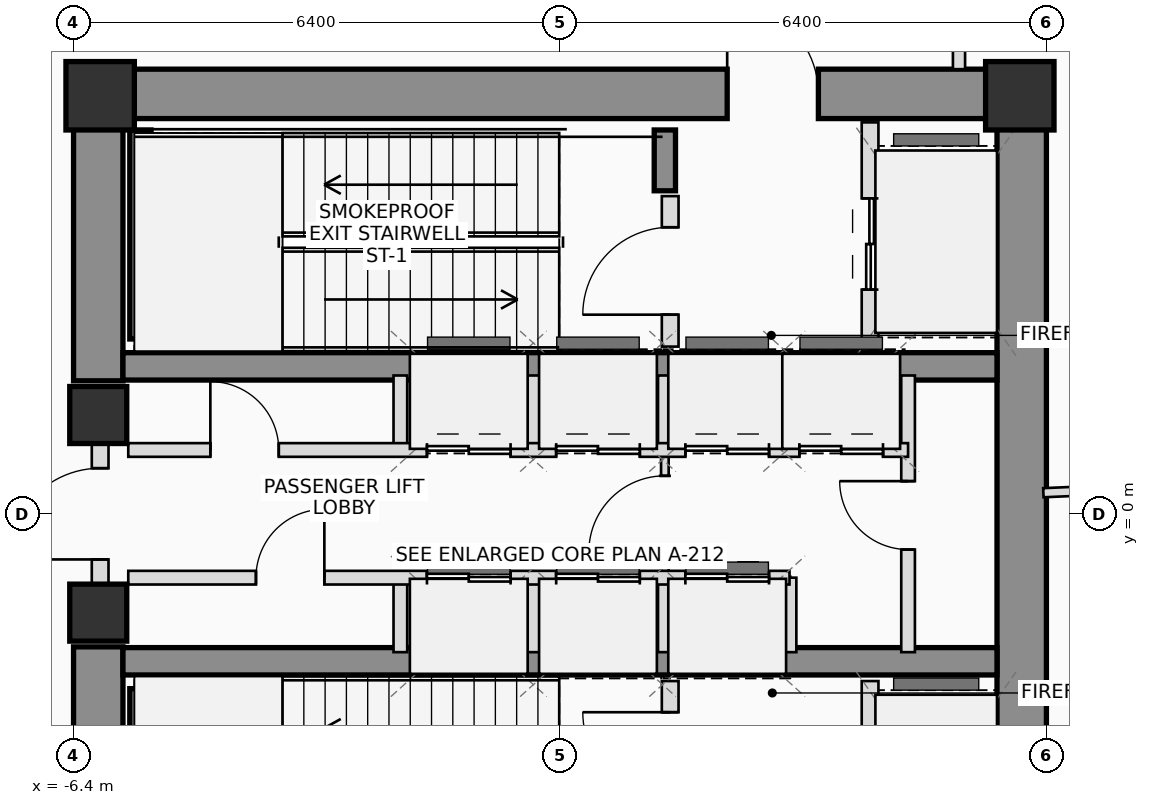
"""IFC4 building model, lengths in metres.
Left out: names, types, materials, properties, quantities, classifications, styles, units other than length and angle.
Written with IfcOpenShell. Run it as: python <this file> out.ifc"""

import sys

from ifc_helpers import new_model, si_unit, direction, frame, frame_2d, origin, origin_2d, place, context, subcontext, project, spatial, rectangle, extrude, source, transform, mapped, element, fill, save


model = new_model("IFC4")
c1 = context("Model", 3, precision=1e-05, world=origin(), true_north=direction((0.0, 1.0)))
c2 = subcontext(c1, "Body", "Model", "MODEL_VIEW")
j1 = project(units=[si_unit("LENGTHUNIT", "METRE"), si_unit("PLANEANGLEUNIT", "RADIAN")], contexts=[c1])
p1 = place(None, origin())
s1 = spatial("IfcSite", under=j1, at=p1, CompositionType="ELEMENT")
p2 = place(p1, origin())
s2 = spatial("IfcBuilding", under=s1, at=p2, CompositionType="ELEMENT")
p3 = place(p2, frame((0.0, 0.0, 125.0)))
s3 = spatial("IfcBuildingStorey", under=s2, at=p3, CompositionType="ELEMENT", Elevation=125.0)
m1 = source(origin(), c2, "Body", "SweptSolid", [
    extrude(rectangle(XDim=0.9, YDim=0.9, at=origin_2d()), origin(), (0.0, 0.0, 1.0), 4.5),
])
for number, where, z_axis, x_axis in (
    (1, (6.05, 5.5, 0.0), (0.0, 0.0, 1.0), (1.0, 0.0, 0.0)),
    (2, (-6.05, 5.5, 0.0), (0.0, 0.0, 1.0), (1.0, 0.0, 0.0)),
):
    element("IfcColumn", number, at=place(p3, frame(where, z_axis=z_axis, x_axis=x_axis)), inside=s3, PredefinedType="COLUMN", context=c2, shape_type="MappedRepresentation", body=[
        mapped(m1, transform((0.0, 0.0, 0.0), scale=1.0)),
    ])
p4 = place(p3, frame((-6.4, 5.525, 0.0), z_axis=(0.0, 0.0, 1.0), x_axis=(1.0, 0.0, 0.0)))
e3 = element("IfcWall", 3, at=p4, inside=s3, PredefinedType="SHEAR", context=c2, shape_type="SweptSolid", body=[
    extrude(rectangle(XDim=12.8, YDim=0.65, at=frame_2d((6.4, 0.0))), origin(), (0.0, 0.0, 1.0), 4.5),
])
p5 = place(p4, frame((8.6, 0.0, 0.0)))
e4 = element("IfcOpeningElement", 4, at=p5, cuts=e3, PredefinedType="OPENING", context=c2, shape_type="SweptSolid", body=[
    extrude(rectangle(XDim=1.2, YDim=2.2, at=frame_2d((0.6, 1.1))), frame((0.0, 0.335, 0.0), z_axis=(0.0, -1.0, 0.0), x_axis=(1.0, 0.0, 0.0)), (0.0, 0.0, 1.0), 0.67),
])
p6 = place(p3, frame((6.075, -5.2, 0.0), z_axis=(0.0, 0.0, 1.0), x_axis=(0.0, 1.0, 0.0)))
e5 = element("IfcWall", 5, at=p6, inside=s3, PredefinedType="SHEAR", context=c2, shape_type="SweptSolid", body=[
    extrude(rectangle(XDim=10.4, YDim=0.65, at=frame_2d((5.2, 0.0))), origin(), (0.0, 0.0, 1.0), 4.5),
])
for number, where, z_axis, x_axis in (
    (6, (-6.075, -5.2, 0.0), (0.0, 0.0, 1.0), (0.0, 1.0, 0.0)),
    (7, (-6.075, 1.75, 0.0), (0.0, 0.0, 1.0), (0.0, 1.0, 0.0)),
):
    element("IfcWall", number, at=place(p3, frame(where, z_axis=z_axis, x_axis=x_axis)), inside=s3, PredefinedType="SHEAR", context=c2, shape_type="SweptSolid", body=[
        extrude(rectangle(XDim=3.45, YDim=0.65, at=frame_2d((1.725, 0.0))), origin(), (0.0, 0.0, 1.0), 4.5),
    ])
for number, where, z_axis, x_axis in (
    (8, (-5.75, 1.94, 0.0), (0.0, 0.0, 1.0), (1.0, 0.0, 0.0)),
    (9, (-5.75, -1.94, 0.0), (0.0, 0.0, 1.0), (1.0, 0.0, 0.0)),
):
    element("IfcWall", number, at=place(p3, frame(where, z_axis=z_axis, x_axis=x_axis)), inside=s3, PredefinedType="SHEAR", context=c2, shape_type="SweptSolid", body=[
        extrude(rectangle(XDim=11.5, YDim=0.36, at=frame_2d((5.75, 0.0))), origin(), (0.0, 0.0, 1.0), 4.5),
    ])
p7 = place(p3, frame((-5.52, 2.3, 0.0), z_axis=(0.0, 0.0, 1.0), x_axis=(0.0, 1.0, 0.0)))
e10 = element("IfcWall", 10, at=p7, inside=s3, PredefinedType="SHEAR", context=c2, shape_type="SweptSolid", body=[
    extrude(rectangle(XDim=2.75, YDim=0.28, at=frame_2d((1.375, 0.0))), origin(), (0.0, 0.0, 1.0), 4.5),
])
p8 = place(p3, frame((1.38, 4.25, 0.0), z_axis=(0.0, 0.0, 1.0), x_axis=(0.0, 1.0, 0.0)))
e11 = element("IfcWall", 11, at=p8, inside=s3, PredefinedType="SHEAR", context=c2, shape_type="SweptSolid", body=[
    extrude(rectangle(XDim=0.8, YDim=0.28, at=frame_2d((0.4, 0.0))), origin(), (0.0, 0.0, 1.0), 4.5),
])
p9 = place(p3, frame((-5.52, -5.05, 0.0), z_axis=(0.0, 0.0, 1.0), x_axis=(0.0, 1.0, 0.0)))
e12 = element("IfcWall", 12, at=p9, inside=s3, PredefinedType="SHEAR", context=c2, shape_type="SweptSolid", body=[
    extrude(rectangle(XDim=2.75, YDim=0.28, at=frame_2d((1.375, 0.0))), origin(), (0.0, 0.0, 1.0), 4.5),
])
m2 = source(origin(), c2, "Body", "SweptSolid", [
    extrude(rectangle(XDim=0.75, YDim=0.75, at=origin_2d()), origin(), (0.0, 0.0, 1.0), 4.5),
])
for number, where, z_axis, x_axis in (
    (13, (-6.075, -1.3, 0.0), (0.0, 0.0, 1.0), (1.0, 0.0, 0.0)),
    (14, (-6.075, 1.3, 0.0), (0.0, 0.0, 1.0), (1.0, 0.0, 0.0)),
):
    element("IfcColumn", number, at=place(p3, frame(where, z_axis=z_axis, x_axis=x_axis)), inside=s3, PredefinedType="COLUMN", context=c2, shape_type="MappedRepresentation", body=[
        mapped(m2, transform((0.0, 0.0, 0.0), scale=1.0)),
    ])
p10 = place(p3, frame((-6.05, -0.95, 0.0), z_axis=(0.0, 0.0, 1.0), x_axis=(0.0, 1.0, 0.0)))
e15 = element("IfcWall", 15, at=p10, inside=s3, PredefinedType="PLUMBINGWALL", context=c2, shape_type="SweptSolid", body=[
    extrude(rectangle(XDim=1.9, YDim=0.22, at=frame_2d((0.95, 0.0))), origin(), (0.0, 0.0, 1.0), 3.28),
])
p11 = place(p10, frame((0.35, 0.0, 0.0)))
e16 = element("IfcOpeningElement", 16, at=p11, cuts=e15, PredefinedType="OPENING", context=c2, shape_type="SweptSolid", body=[
    extrude(rectangle(XDim=1.2, YDim=2.2, at=frame_2d((0.6, 1.1))), frame((0.0, 0.12, 0.0), z_axis=(0.0, -1.0, 0.0), x_axis=(1.0, 0.0, 0.0)), (0.0, 0.0, 1.0), 0.24),
])
p12 = place(p3, frame((1.45, 2.2, 0.0), z_axis=(0.0, 0.0, 1.0), x_axis=(0.0, 1.0, 0.0)))
e17 = element("IfcWall", 17, at=p12, inside=s3, PredefinedType="PLUMBINGWALL", context=c2, shape_type="SweptSolid", body=[
    extrude(rectangle(XDim=1.98, YDim=0.22, at=frame_2d((0.99, 0.0))), origin(), (0.0, 0.0, 1.0), 4.3),
])
p13 = place(p12, frame((0.42, 0.0, 0.0)))
e18 = element("IfcOpeningElement", 18, at=p13, cuts=e17, PredefinedType="OPENING", context=c2, shape_type="SweptSolid", body=[
    extrude(rectangle(XDim=1.15, YDim=2.15, at=frame_2d((0.575, 1.075))), frame((0.0, 0.12, 0.0), z_axis=(0.0, -1.0, 0.0), x_axis=(1.0, 0.0, 0.0)), (0.0, 0.0, 1.0), 0.24),
])
p14 = place(p3, frame((4.08, 2.2, 0.0), z_axis=(0.0, 0.0, 1.0), x_axis=(0.0, 1.0, 0.0)))
e19 = element("IfcWall", 19, at=p14, inside=s3, PredefinedType="PLUMBINGWALL", context=c2, shape_type="SweptSolid", body=[
    extrude(rectangle(XDim=2.95, YDim=0.22, at=frame_2d((1.475, 0.0))), origin(), (0.0, 0.0, 1.0), 4.3),
])
p15 = place(p14, frame((0.75, 0.0, 0.0)))
e20 = element("IfcOpeningElement", 20, at=p15, cuts=e19, PredefinedType="OPENING", context=c2, shape_type="SweptSolid", body=[
    extrude(rectangle(XDim=1.2, YDim=2.25, at=frame_2d((0.6, 1.125))), frame((0.0, 0.12, 0.0), z_axis=(0.0, -1.0, 0.0), x_axis=(1.0, 0.0, 0.0)), (0.0, 0.0, 1.0), 0.24),
])
p16 = place(p3, frame((1.45, -4.18, 0.0), z_axis=(0.0, 0.0, 1.0), x_axis=(0.0, 1.0, 0.0)))
e21 = element("IfcWall", 21, at=p16, inside=s3, PredefinedType="PLUMBINGWALL", context=c2, shape_type="SweptSolid", body=[
    extrude(rectangle(XDim=1.98, YDim=0.22, at=frame_2d((0.99, 0.0))), origin(), (0.0, 0.0, 1.0), 4.3),
])
p17 = place(p16, frame((0.42, 0.0, 0.0)))
e22 = element("IfcOpeningElement", 22, at=p17, cuts=e21, PredefinedType="OPENING", context=c2, shape_type="SweptSolid", body=[
    extrude(rectangle(XDim=1.15, YDim=2.15, at=frame_2d((0.575, 1.075))), frame((0.0, 0.12, 0.0), z_axis=(0.0, -1.0, 0.0), x_axis=(1.0, 0.0, 0.0)), (0.0, 0.0, 1.0), 0.24),
])
p18 = place(p3, frame((4.08, -5.15, 0.0), z_axis=(0.0, 0.0, 1.0), x_axis=(0.0, 1.0, 0.0)))
e23 = element("IfcWall", 23, at=p18, inside=s3, PredefinedType="PLUMBINGWALL", context=c2, shape_type="SweptSolid", body=[
    extrude(rectangle(XDim=2.95, YDim=0.22, at=frame_2d((1.475, 0.0))), origin(), (0.0, 0.0, 1.0), 4.3),
])
p19 = place(p18, frame((0.95, 0.0, 0.0)))
e24 = element("IfcOpeningElement", 24, at=p19, cuts=e23, PredefinedType="OPENING", context=c2, shape_type="SweptSolid", body=[
    extrude(rectangle(XDim=1.2, YDim=2.25, at=frame_2d((0.6, 1.125))), frame((0.0, 0.12, 0.0), z_axis=(0.0, -1.0, 0.0), x_axis=(1.0, 0.0, 0.0)), (0.0, 0.0, 1.0), 0.24),
])
p20 = place(p3, frame((1.38, -0.84, 0.0), z_axis=(0.0, 0.0, 1.0), x_axis=(0.0, 1.0, 0.0)))
e25 = element("IfcWall", 25, at=p20, inside=s3, PredefinedType="PARTITIONING", context=c2, shape_type="SweptSolid", body=[
    extrude(rectangle(XDim=1.68, YDim=0.1, at=frame_2d((0.84, 0.0))), origin(), (0.0, 0.0, 1.0), 4.3),
])
p21 = place(p20, frame((0.34, 0.0, 0.0)))
e26 = element("IfcOpeningElement", 26, at=p21, cuts=e25, PredefinedType="OPENING", context=c2, shape_type="SweptSolid", body=[
    extrude(rectangle(XDim=1.0, YDim=2.25, at=frame_2d((0.5, 1.125))), frame((0.0, 0.06, 0.0), z_axis=(0.0, -1.0, 0.0), x_axis=(1.0, 0.0, 0.0)), (0.0, 0.0, 1.0), 0.12),
])
for number, where, z_axis, x_axis in (
    (27, (-2.1, 0.84, 0.0), (0.0, 0.0, 1.0), (0.0, 1.0, 0.0)),
    (28, (-2.1, -1.82, 0.0), (0.0, 0.0, 1.0), (0.0, 1.0, 0.0)),
    (29, (-0.35, 0.84, 0.0), (0.0, 0.0, 1.0), (0.0, 1.0, 0.0)),
    (30, (-0.35, -1.82, 0.0), (0.0, 0.0, 1.0), (0.0, 1.0, 0.0)),
    (31, (1.38, 0.84, 0.0), (0.0, 0.0, 1.0), (0.0, 1.0, 0.0)),
    (32, (1.38, -1.82, 0.0), (0.0, 0.0, 1.0), (0.0, 1.0, 0.0)),
    (33, (3.02, 0.84, 0.0), (0.0, 0.0, 1.0), (0.0, 1.0, 0.0)),
    (34, (4.38, 0.84, 0.0), (0.0, 0.0, 1.0), (0.0, 1.0, 0.0)),
    (35, (3.02, -1.82, 0.0), (0.0, 0.0, 1.0), (0.0, 1.0, 0.0)),
):
    element("IfcWall", number, at=place(p3, frame(where, z_axis=z_axis, x_axis=x_axis)), inside=s3, PredefinedType="PLUMBINGWALL", context=c2, shape_type="SweptSolid", body=[
        extrude(rectangle(XDim=0.98, YDim=0.18, at=frame_2d((0.49, 0.0))), origin(), (0.0, 0.0, 1.0), 4.3),
    ])
p22 = place(p3, frame((4.58, -1.82, 0.0), z_axis=(0.0, 0.0, 1.0), x_axis=(0.0, 1.0, 0.0)))
e36 = element("IfcWall", 36, at=p22, inside=s3, PredefinedType="PLUMBINGWALL", context=c2, shape_type="SweptSolid", body=[
    extrude(rectangle(XDim=3.64, YDim=0.18, at=frame_2d((1.82, 0.0))), origin(), (0.0, 0.0, 1.0), 4.3),
])
p23 = place(p22, frame((1.35, 0.0, 0.0)))
e37 = element("IfcOpeningElement", 37, at=p23, cuts=e36, PredefinedType="OPENING", context=c2, shape_type="SweptSolid", body=[
    extrude(rectangle(XDim=0.9, YDim=2.05, at=frame_2d((0.45, 1.025))), frame((0.0, 0.1, 0.0), z_axis=(0.0, -1.0, 0.0), x_axis=(1.0, 0.0, 0.0)), (0.0, 0.0, 1.0), 0.2),
])
p24 = place(p3, frame((-5.68, 0.84, 0.0), z_axis=(0.0, 0.0, 1.0), x_axis=(1.0, 0.0, 0.0)))
e38 = element("IfcWall", 38, at=p24, inside=s3, PredefinedType="PLUMBINGWALL", context=c2, shape_type="SweptSolid", body=[
    extrude(rectangle(XDim=10.26, YDim=0.18, at=frame_2d((5.13, 0.0))), origin(), (0.0, 0.0, 1.0), 4.3),
])
p25 = place(p24, frame((1.08, 0.0, 0.0)))
e39 = element("IfcOpeningElement", 39, at=p25, cuts=e38, PredefinedType="OPENING", context=c2, shape_type="SweptSolid", body=[
    extrude(rectangle(XDim=0.9, YDim=2.05, at=frame_2d((0.45, 1.025))), frame((0.0, 0.1, 0.0), z_axis=(0.0, -1.0, 0.0), x_axis=(1.0, 0.0, 0.0)), (0.0, 0.0, 1.0), 0.2),
])
p26 = place(p24, frame((3.93, 0.0, 0.0)))
e40 = element("IfcOpeningElement", 40, at=p26, cuts=e38, PredefinedType="OPENING", context=c2, shape_type="SweptSolid", body=[
    extrude(rectangle(XDim=1.1, YDim=2.2, at=frame_2d((0.55, 1.1))), frame((0.0, 0.1, 0.0), z_axis=(0.0, -1.0, 0.0), x_axis=(1.0, 0.0, 0.0)), (0.0, 0.0, 1.0), 0.2),
])
p27 = place(p24, frame((5.63, 0.0, 0.0)))
e41 = element("IfcOpeningElement", 41, at=p27, cuts=e38, PredefinedType="OPENING", context=c2, shape_type="SweptSolid", body=[
    extrude(rectangle(XDim=1.1, YDim=2.2, at=frame_2d((0.55, 1.1))), frame((0.0, 0.1, 0.0), z_axis=(0.0, -1.0, 0.0), x_axis=(1.0, 0.0, 0.0)), (0.0, 0.0, 1.0), 0.2),
])
p28 = place(p24, frame((7.33, 0.0, 0.0)))
e42 = element("IfcOpeningElement", 42, at=p28, cuts=e38, PredefinedType="OPENING", context=c2, shape_type="SweptSolid", body=[
    extrude(rectangle(XDim=1.1, YDim=2.2, at=frame_2d((0.55, 1.1))), frame((0.0, 0.1, 0.0), z_axis=(0.0, -1.0, 0.0), x_axis=(1.0, 0.0, 0.0)), (0.0, 0.0, 1.0), 0.2),
])
p29 = place(p24, frame((8.83, 0.0, 0.0)))
e43 = element("IfcOpeningElement", 43, at=p29, cuts=e38, PredefinedType="OPENING", context=c2, shape_type="SweptSolid", body=[
    extrude(rectangle(XDim=1.1, YDim=2.2, at=frame_2d((0.55, 1.1))), frame((0.0, 0.1, 0.0), z_axis=(0.0, -1.0, 0.0), x_axis=(1.0, 0.0, 0.0)), (0.0, 0.0, 1.0), 0.2),
])
p30 = place(p3, frame((-5.68, -0.84, 0.0), z_axis=(0.0, 0.0, 1.0), x_axis=(1.0, 0.0, 0.0)))
e44 = element("IfcWall", 44, at=p30, inside=s3, PredefinedType="PLUMBINGWALL", context=c2, shape_type="SweptSolid", body=[
    extrude(rectangle(XDim=8.7, YDim=0.18, at=frame_2d((4.35, 0.0))), origin(), (0.0, 0.0, 1.0), 4.3),
])
p31 = place(p30, frame((1.68, 0.0, 0.0)))
e45 = element("IfcOpeningElement", 45, at=p31, cuts=e44, PredefinedType="OPENING", context=c2, shape_type="SweptSolid", body=[
    extrude(rectangle(XDim=0.9, YDim=2.05, at=frame_2d((0.45, 1.025))), frame((0.0, 0.1, 0.0), z_axis=(0.0, -1.0, 0.0), x_axis=(1.0, 0.0, 0.0)), (0.0, 0.0, 1.0), 0.2),
])
p32 = place(p30, frame((3.93, 0.0, 0.0)))
e46 = element("IfcOpeningElement", 46, at=p32, cuts=e44, PredefinedType="OPENING", context=c2, shape_type="SweptSolid", body=[
    extrude(rectangle(XDim=1.1, YDim=2.2, at=frame_2d((0.55, 1.1))), frame((0.0, 0.1, 0.0), z_axis=(0.0, -1.0, 0.0), x_axis=(1.0, 0.0, 0.0)), (0.0, 0.0, 1.0), 0.2),
])
p33 = place(p30, frame((5.63, 0.0, 0.0)))
e47 = element("IfcOpeningElement", 47, at=p33, cuts=e44, PredefinedType="OPENING", context=c2, shape_type="SweptSolid", body=[
    extrude(rectangle(XDim=1.1, YDim=2.2, at=frame_2d((0.55, 1.1))), frame((0.0, 0.1, 0.0), z_axis=(0.0, -1.0, 0.0), x_axis=(1.0, 0.0, 0.0)), (0.0, 0.0, 1.0), 0.2),
])
p34 = place(p30, frame((7.33, 0.0, 0.0)))
e48 = element("IfcOpeningElement", 48, at=p34, cuts=e44, PredefinedType="OPENING", context=c2, shape_type="SweptSolid", body=[
    extrude(rectangle(XDim=1.1, YDim=2.2, at=frame_2d((0.55, 1.1))), frame((0.0, 0.1, 0.0), z_axis=(0.0, -1.0, 0.0), x_axis=(1.0, 0.0, 0.0)), (0.0, 0.0, 1.0), 0.2),
])
p35 = place(p3, frame((5.25, 7.5, 0.0), z_axis=(0.0, 0.0, 1.0), x_axis=(0.0, -1.0, 0.0)))
e49 = element("IfcWall", 49, at=p35, inside=s3, PredefinedType="PARTITIONING", context=c2, shape_type="SweptSolid", body=[
    extrude(rectangle(XDim=1.65, YDim=0.16, at=frame_2d((0.825, 0.0))), origin(), (0.0, 0.0, 1.0), 3.655),
])
p36 = place(p3, frame((6.36, 0.278, 0.0), z_axis=(0.0, 0.0, 1.0), x_axis=(0.999047913846, 0.043626435113, 0.0)))
e50 = element("IfcWall", 50, at=p36, inside=s3, PredefinedType="PARTITIONING", context=c2, shape_type="SweptSolid", body=[
    extrude(rectangle(XDim=9.575, YDim=0.12, at=frame_2d((4.788, 0.0))), origin(), (0.0, 0.0, 1.0), 3.655),
])
p37 = place(p5, origin())
e51 = element("IfcDoor", 51, at=p37, inside=s3, OperationType="SINGLE_SWING_LEFT", PredefinedType="DOOR", context=c2, shape_type="SweptSolid", body=[
    extrude(rectangle(XDim=1.2, YDim=2.2, at=frame_2d((0.6, 1.1))), frame((0.0, 0.025, 0.0), z_axis=(0.0, -1.0, 0.0), x_axis=(1.0, 0.0, 0.0)), (0.0, 0.0, 1.0), 0.05),
])
fill(e4, e51)
p38 = place(p11, origin())
e52 = element("IfcDoor", 52, at=p38, inside=s3, OperationType="SINGLE_SWING_LEFT", PredefinedType="DOOR", context=c2, shape_type="SweptSolid", body=[
    extrude(rectangle(XDim=1.2, YDim=2.2, at=frame_2d((0.6, 1.1))), frame((0.0, 0.025, 0.0), z_axis=(0.0, -1.0, 0.0), x_axis=(1.0, 0.0, 0.0)), (0.0, 0.0, 1.0), 0.05),
])
fill(e16, e52)
p39 = place(p13, origin())
e53 = element("IfcDoor", 53, at=p39, inside=s3, OperationType="SINGLE_SWING_LEFT", PredefinedType="DOOR", context=c2, shape_type="SweptSolid", body=[
    extrude(rectangle(XDim=1.15, YDim=2.15, at=frame_2d((0.575, 1.075))), frame((0.0, 0.025, 0.0), z_axis=(0.0, -1.0, 0.0), x_axis=(1.0, 0.0, 0.0)), (0.0, 0.0, 1.0), 0.05),
])
fill(e18, e53)
p40 = place(p15, origin())
e54 = element("IfcDoor", 54, at=p40, inside=s3, OperationType="DOUBLE_DOOR_SLIDING", PredefinedType="DOOR", context=c2, shape_type="SweptSolid", body=[
    extrude(rectangle(XDim=1.2, YDim=2.25, at=frame_2d((0.6, 1.125))), frame((0.0, 0.025, 0.0), z_axis=(0.0, -1.0, 0.0), x_axis=(1.0, 0.0, 0.0)), (0.0, 0.0, 1.0), 0.05),
])
fill(e20, e54)
p41 = place(p17, origin())
e55 = element("IfcDoor", 55, at=p41, inside=s3, OperationType="SINGLE_SWING_RIGHT", PredefinedType="DOOR", context=c2, shape_type="SweptSolid", body=[
    extrude(rectangle(XDim=1.15, YDim=2.15, at=frame_2d((0.575, 1.075))), frame((0.0, 0.025, 0.0), z_axis=(0.0, -1.0, 0.0), x_axis=(1.0, 0.0, 0.0)), (0.0, 0.0, 1.0), 0.05),
])
fill(e22, e55)
p42 = place(p21, origin())
e56 = element("IfcDoor", 56, at=p42, inside=s3, OperationType="SINGLE_SWING_LEFT", PredefinedType="DOOR", context=c2, shape_type="SweptSolid", body=[
    extrude(rectangle(XDim=1.0, YDim=2.25, at=frame_2d((0.5, 1.125))), frame((0.0, 0.025, 0.0), z_axis=(0.0, -1.0, 0.0), x_axis=(1.0, 0.0, 0.0)), (0.0, 0.0, 1.0), 0.05),
])
fill(e26, e56)
p43 = place(p23, origin())
e57 = element("IfcDoor", 57, at=p43, inside=s3, OperationType="SINGLE_SWING_RIGHT", PredefinedType="DOOR", context=c2, shape_type="SweptSolid", body=[
    extrude(rectangle(XDim=0.9, YDim=2.05, at=frame_2d((0.45, 1.025))), frame((0.0, 0.025, 0.0), z_axis=(0.0, -1.0, 0.0), x_axis=(1.0, 0.0, 0.0)), (0.0, 0.0, 1.0), 0.05),
])
fill(e37, e57)
p44 = place(p25, origin())
e58 = element("IfcDoor", 58, at=p44, inside=s3, OperationType="SINGLE_SWING_LEFT", PredefinedType="DOOR", context=c2, shape_type="SweptSolid", body=[
    extrude(rectangle(XDim=0.9, YDim=2.05, at=frame_2d((0.45, 1.025))), frame((0.0, 0.025, 0.0), z_axis=(0.0, -1.0, 0.0), x_axis=(1.0, 0.0, 0.0)), (0.0, 0.0, 1.0), 0.05),
])
fill(e39, e58)
p45 = place(p26, origin())
e59 = element("IfcDoor", 59, at=p45, inside=s3, OperationType="DOUBLE_DOOR_SLIDING", PredefinedType="DOOR", context=c2, shape_type="SweptSolid", body=[
    extrude(rectangle(XDim=1.1, YDim=2.2, at=frame_2d((0.55, 1.1))), frame((0.0, 0.025, 0.0), z_axis=(0.0, -1.0, 0.0), x_axis=(1.0, 0.0, 0.0)), (0.0, 0.0, 1.0), 0.05),
])
fill(e40, e59)
p46 = place(p27, origin())
e60 = element("IfcDoor", 60, at=p46, inside=s3, OperationType="DOUBLE_DOOR_SLIDING", PredefinedType="DOOR", context=c2, shape_type="SweptSolid", body=[
    extrude(rectangle(XDim=1.1, YDim=2.2, at=frame_2d((0.55, 1.1))), frame((0.0, 0.025, 0.0), z_axis=(0.0, -1.0, 0.0), x_axis=(1.0, 0.0, 0.0)), (0.0, 0.0, 1.0), 0.05),
])
fill(e41, e60)
p47 = place(p28, origin())
e61 = element("IfcDoor", 61, at=p47, inside=s3, OperationType="DOUBLE_DOOR_SLIDING", PredefinedType="DOOR", context=c2, shape_type="SweptSolid", body=[
    extrude(rectangle(XDim=1.1, YDim=2.2, at=frame_2d((0.55, 1.1))), frame((0.0, 0.025, 0.0), z_axis=(0.0, -1.0, 0.0), x_axis=(1.0, 0.0, 0.0)), (0.0, 0.0, 1.0), 0.05),
])
fill(e42, e61)
p48 = place(p29, origin())
e62 = element("IfcDoor", 62, at=p48, inside=s3, OperationType="DOUBLE_DOOR_SLIDING", PredefinedType="DOOR", context=c2, shape_type="SweptSolid", body=[
    extrude(rectangle(XDim=1.1, YDim=2.2, at=frame_2d((0.55, 1.1))), frame((0.0, 0.025, 0.0), z_axis=(0.0, -1.0, 0.0), x_axis=(1.0, 0.0, 0.0)), (0.0, 0.0, 1.0), 0.05),
])
fill(e43, e62)
p49 = place(p31, origin())
e63 = element("IfcDoor", 63, at=p49, inside=s3, OperationType="SINGLE_SWING_RIGHT", PredefinedType="DOOR", context=c2, shape_type="SweptSolid", body=[
    extrude(rectangle(XDim=0.9, YDim=2.05, at=frame_2d((0.45, 1.025))), frame((0.0, 0.025, 0.0), z_axis=(0.0, -1.0, 0.0), x_axis=(1.0, 0.0, 0.0)), (0.0, 0.0, 1.0), 0.05),
])
fill(e45, e63)
p50 = place(p32, origin())
e64 = element("IfcDoor", 64, at=p50, inside=s3, OperationType="DOUBLE_DOOR_SLIDING", PredefinedType="DOOR", context=c2, shape_type="SweptSolid", body=[
    extrude(rectangle(XDim=1.1, YDim=2.2, at=frame_2d((0.55, 1.1))), frame((0.0, 0.025, 0.0), z_axis=(0.0, -1.0, 0.0), x_axis=(1.0, 0.0, 0.0)), (0.0, 0.0, 1.0), 0.05),
])
fill(e46, e64)
p51 = place(p33, origin())
e65 = element("IfcDoor", 65, at=p51, inside=s3, OperationType="DOUBLE_DOOR_SLIDING", PredefinedType="DOOR", context=c2, shape_type="SweptSolid", body=[
    extrude(rectangle(XDim=1.1, YDim=2.2, at=frame_2d((0.55, 1.1))), frame((0.0, 0.025, 0.0), z_axis=(0.0, -1.0, 0.0), x_axis=(1.0, 0.0, 0.0)), (0.0, 0.0, 1.0), 0.05),
])
fill(e47, e65)
p52 = place(p34, origin())
e66 = element("IfcDoor", 66, at=p52, inside=s3, OperationType="DOUBLE_DOOR_SLIDING", PredefinedType="DOOR", context=c2, shape_type="SweptSolid", body=[
    extrude(rectangle(XDim=1.1, YDim=2.2, at=frame_2d((0.55, 1.1))), frame((0.0, 0.025, 0.0), z_axis=(0.0, -1.0, 0.0), x_axis=(1.0, 0.0, 0.0)), (0.0, 0.0, 1.0), 0.05),
])
fill(e48, e66)
save(model, sys.argv[1])
